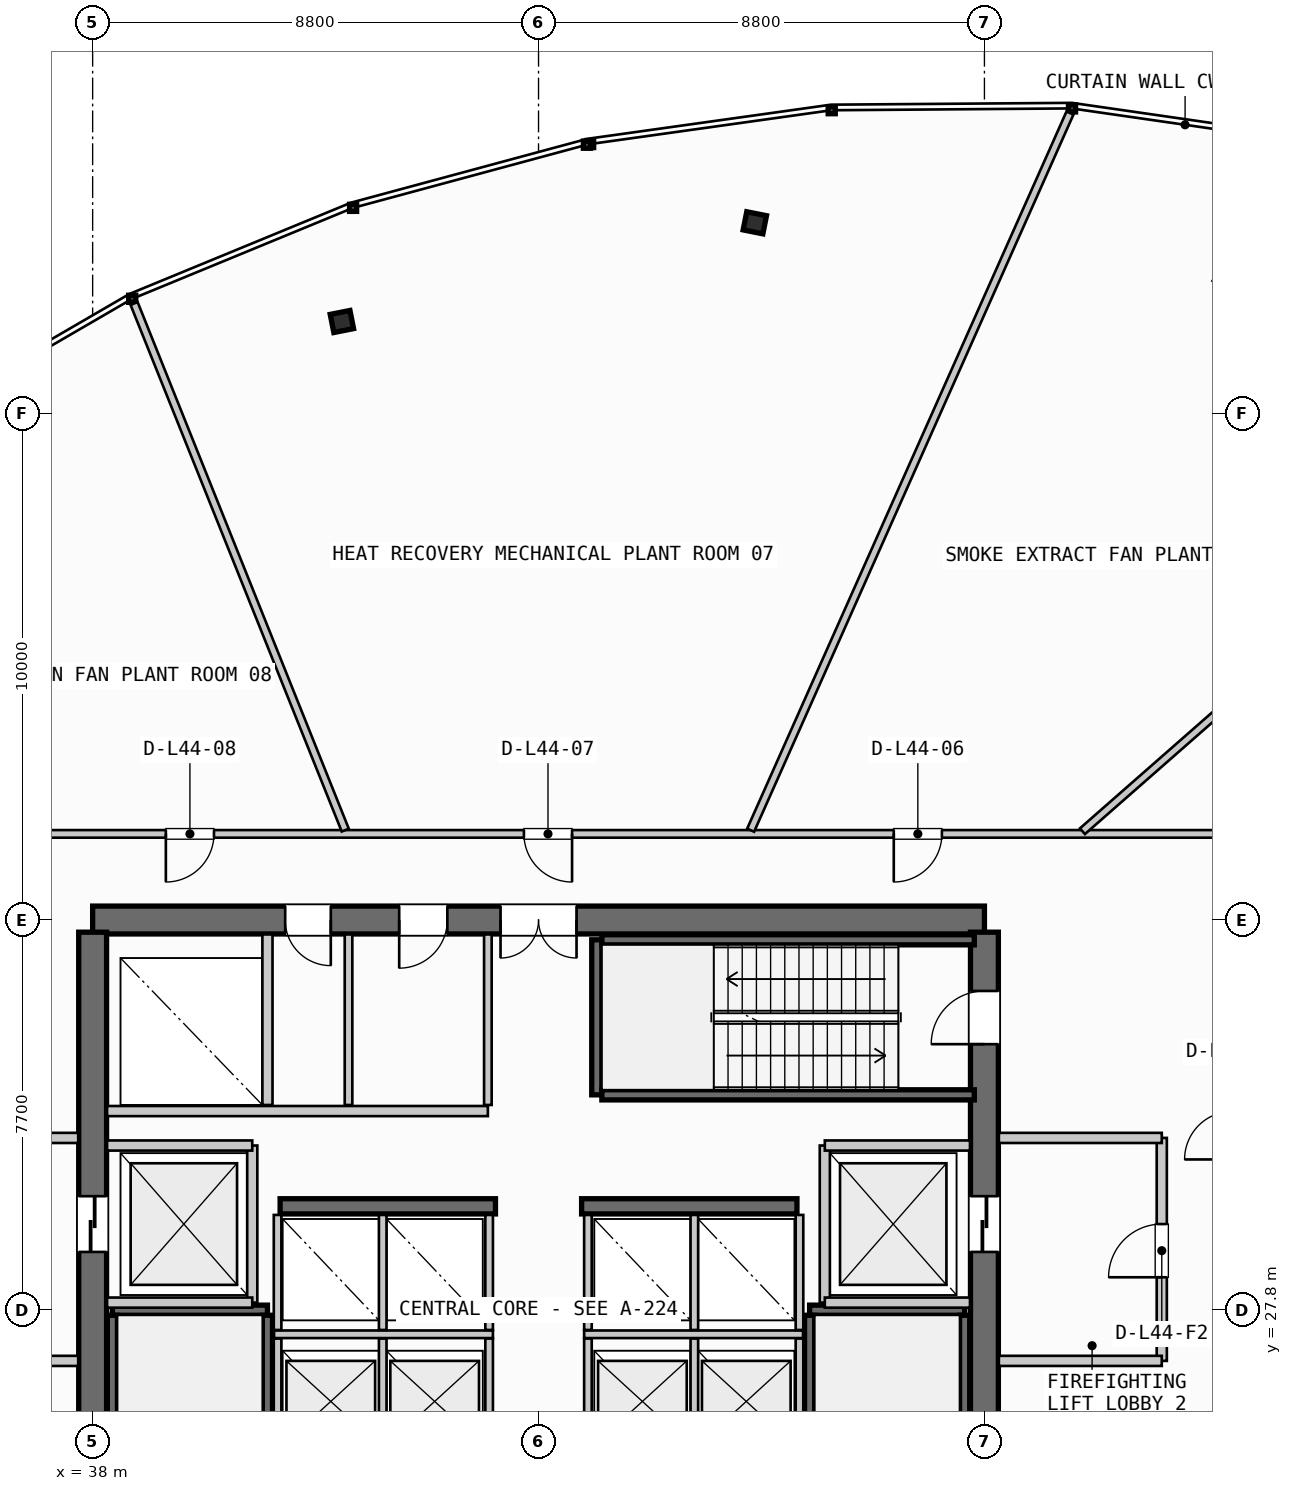
"""IFC4 building model, lengths in metres.
Left out: names, types, materials, properties, quantities, classifications, styles, units other than length and angle.
Written with IfcOpenShell. Run it as: python <this file> out.ifc"""

import sys

from ifc_helpers import new_model, si_unit, direction, frame, frame_2d, origin, origin_2d, place, context, subcontext, project, spatial, rectangle, i_section, extrude, source, transform, mapped, element, fill, save


model = new_model("IFC4")
c1 = context("Model", 3, precision=1e-05, world=origin(), true_north=direction((0.0, 1.0)))
c2 = subcontext(c1, "Body", "Model", "MODEL_VIEW")
j1 = project(units=[si_unit("LENGTHUNIT", "METRE"), si_unit("PLANEANGLEUNIT", "RADIAN")], contexts=[c1])
p1 = place(None, origin())
s1 = spatial("IfcSite", under=j1, at=p1, CompositionType="ELEMENT")
p2 = place(p1, origin())
s2 = spatial("IfcBuilding", under=s1, at=p2, CompositionType="ELEMENT")
p3 = place(p2, frame((0.0, 0.0, 171.4)))
s3 = spatial("IfcBuildingStorey", under=s2, at=p3, CompositionType="ELEMENT", Elevation=171.4)
p4 = place(p3, frame((55.6, 35.5, 0.0), z_axis=(0.0, 0.0, 1.0), x_axis=(-1.0, 0.0, 0.0)))
e1 = element("IfcWall", 1, at=p4, inside=s3, PredefinedType="SHEAR", context=c2, shape_type="SweptSolid", body=[
    extrude(rectangle(XDim=17.6, YDim=0.55, at=frame_2d((8.8, 0.0))), origin(), (0.0, 0.0, 1.0), 4.58),
])
p5 = place(p4, frame((8.05, 0.0, 0.0)))
e2 = element("IfcOpeningElement", 2, at=p5, cuts=e1, PredefinedType="OPENING", context=c2, shape_type="SweptSolid", body=[
    extrude(rectangle(XDim=1.5, YDim=2.2, at=frame_2d((0.75, 1.1))), frame((0.0, 0.285, 0.0), z_axis=(0.0, -1.0, 0.0), x_axis=(1.0, 0.0, 0.0)), (0.0, 0.0, 1.0), 0.57),
])
p6 = place(p4, frame((12.9, 0.0, 0.0)))
e3 = element("IfcOpeningElement", 3, at=p6, cuts=e1, PredefinedType="OPENING", context=c2, shape_type="SweptSolid", body=[
    extrude(rectangle(XDim=0.9, YDim=2.15, at=frame_2d((0.45, 1.075))), frame((0.0, 0.285, 0.0), z_axis=(0.0, -1.0, 0.0), x_axis=(1.0, 0.0, 0.0)), (0.0, 0.0, 1.0), 0.57),
])
p7 = place(p4, frame((10.6, 0.0, 0.0)))
e4 = element("IfcOpeningElement", 4, at=p7, cuts=e1, PredefinedType="OPENING", context=c2, shape_type="SweptSolid", body=[
    extrude(rectangle(XDim=0.95, YDim=2.15, at=frame_2d((0.475, 1.075))), frame((0.0, 0.285, 0.0), z_axis=(0.0, -1.0, 0.0), x_axis=(1.0, 0.0, 0.0)), (0.0, 0.0, 1.0), 0.57),
])
p8 = place(p3, frame((38.0, 35.26, 0.0), z_axis=(0.0, 0.0, 1.0), x_axis=(0.0, -1.0, 0.0)))
e5 = element("IfcWall", 5, at=p8, inside=s3, PredefinedType="SHEAR", context=c2, shape_type="SweptSolid", body=[
    extrude(rectangle(XDim=14.92, YDim=0.55, at=frame_2d((7.46, 0.0))), origin(), (0.0, 0.0, 1.0), 4.58),
])
p9 = place(p8, frame((5.21, 0.0, 0.0)))
e6 = element("IfcOpeningElement", 6, at=p9, cuts=e5, PredefinedType="OPENING", context=c2, shape_type="SweptSolid", body=[
    extrude(rectangle(XDim=1.1, YDim=2.2, at=frame_2d((0.55, 1.1))), frame((0.0, 0.285, 0.0), z_axis=(0.0, -1.0, 0.0), x_axis=(1.0, 0.0, 0.0)), (0.0, 0.0, 1.0), 0.57),
])
p10 = place(p3, frame((55.6, 20.34, 0.0), z_axis=(0.0, 0.0, 1.0), x_axis=(0.0, 1.0, 0.0)))
e7 = element("IfcWall", 7, at=p10, inside=s3, PredefinedType="SHEAR", context=c2, shape_type="SweptSolid", body=[
    extrude(rectangle(XDim=14.92, YDim=0.55, at=frame_2d((7.46, 0.0))), origin(), (0.0, 0.0, 1.0), 4.58),
])
p11 = place(p10, frame((12.71, 0.0, 0.0)))
e8 = element("IfcOpeningElement", 8, at=p11, cuts=e7, PredefinedType="OPENING", context=c2, shape_type="SweptSolid", body=[
    extrude(rectangle(XDim=1.05, YDim=2.15, at=frame_2d((0.525, 1.075))), frame((0.0, 0.285, 0.0), z_axis=(0.0, -1.0, 0.0), x_axis=(1.0, 0.0, 0.0)), (0.0, 0.0, 1.0), 0.57),
])
p12 = place(p10, frame((8.61, 0.0, 0.0)))
e9 = element("IfcOpeningElement", 9, at=p12, cuts=e7, PredefinedType="OPENING", context=c2, shape_type="SweptSolid", body=[
    extrude(rectangle(XDim=1.1, YDim=2.2, at=frame_2d((0.55, 1.1))), frame((0.0, 0.285, 0.0), z_axis=(0.0, -1.0, 0.0), x_axis=(1.0, 0.0, 0.0)), (0.0, 0.0, 1.0), 0.57),
])
for number, where, z_axis, x_axis in (
    (10, (41.7, 29.85, 0.0), (0.0, 0.0, 1.0), (1.0, 0.0, 0.0)),
    (11, (47.65, 29.85, 0.0), (0.0, 0.0, 1.0), (1.0, 0.0, 0.0)),
):
    element("IfcWall", number, at=place(p3, frame(where, z_axis=z_axis, x_axis=x_axis)), inside=s3, PredefinedType="SHEAR", context=c2, shape_type="SweptSolid", body=[
        extrude(rectangle(XDim=4.25, YDim=0.3, at=frame_2d((2.125, 0.0))), origin(), (0.0, 0.0, 1.0), 4.58),
    ])
m1 = source(origin(), c2, "Body", "SweptSolid", [
    extrude(i_section(OverallWidth=0.397, OverallDepth=0.365, WebThickness=0.028, FlangeThickness=0.044, FilletRadius=0.015, at=origin_2d()), origin(), (0.0, 0.0, 1.0), 4.58),
])
for number, where, z_axis, x_axis in (
    (12, (51.069, 49.259, 0.0), (0.0, 0.0, 1.0), (0.195, 0.981, 0.0)),
    (13, (42.919, 47.311, 0.0), (0.0, 0.0, 1.0), (-0.195, 0.981, 0.0)),
):
    element("IfcColumn", number, at=place(p3, frame(where, z_axis=z_axis, x_axis=x_axis)), inside=s3, PredefinedType="COLUMN", context=c2, shape_type="MappedRepresentation", body=[
        mapped(m1, transform((0.0, 0.0, 0.0), scale=1.0)),
    ])
p13 = place(p3, frame((38.39, 27.8, 0.0), z_axis=(0.0, 0.0, 1.0), x_axis=(1.0, 0.0, 0.0)))
e14 = element("IfcWall", 14, at=p13, inside=s3, PredefinedType="SHEAR", context=c2, shape_type="SweptSolid", body=[
    extrude(rectangle(XDim=3.06, YDim=0.2, at=frame_2d((1.53, 0.0))), origin(), (0.0, 0.0, 1.0), 4.58),
])
for number, where, z_axis, x_axis in (
    (15, (41.45, 27.7, 0.0), (0.0, 0.0, 1.0), (0.0, -1.0, 0.0)),
    (16, (38.39, 20.35, 0.0), (0.0, 0.0, 1.0), (0.0, 1.0, 0.0)),
):
    element("IfcWall", number, at=place(p3, frame(where, z_axis=z_axis, x_axis=x_axis)), inside=s3, PredefinedType="SHEAR", context=c2, shape_type="SweptSolid", body=[
        extrude(rectangle(XDim=7.35, YDim=0.2, at=frame_2d((3.675, 0.0))), origin(), (0.0, 0.0, 1.0), 4.58),
    ])
p14 = place(p3, frame((52.15, 27.8, 0.0), z_axis=(0.0, 0.0, 1.0), x_axis=(1.0, 0.0, 0.0)))
e17 = element("IfcWall", 17, at=p14, inside=s3, PredefinedType="SHEAR", context=c2, shape_type="SweptSolid", body=[
    extrude(rectangle(XDim=3.06, YDim=0.2, at=frame_2d((1.53, 0.0))), origin(), (0.0, 0.0, 1.0), 4.58),
])
for number, where, z_axis, x_axis in (
    (18, (55.21, 27.7, 0.0), (0.0, 0.0, 1.0), (0.0, -1.0, 0.0)),
    (19, (52.15, 20.35, 0.0), (0.0, 0.0, 1.0), (0.0, 1.0, 0.0)),
):
    element("IfcWall", number, at=place(p3, frame(where, z_axis=z_axis, x_axis=x_axis)), inside=s3, PredefinedType="SHEAR", context=c2, shape_type="SweptSolid", body=[
        extrude(rectangle(XDim=7.35, YDim=0.2, at=frame_2d((3.675, 0.0))), origin(), (0.0, 0.0, 1.0), 4.58),
    ])
p15 = place(p3, frame((47.95, 32.05, 0.0), z_axis=(0.0, 0.0, 1.0), x_axis=(0.0, 1.0, 0.0)))
e20 = element("IfcWall", 20, at=p15, inside=s3, PredefinedType="SHEAR", context=c2, shape_type="SweptSolid", body=[
    extrude(rectangle(XDim=3.06, YDim=0.2, at=frame_2d((1.53, 0.0))), origin(), (0.0, 0.0, 1.0), 4.58),
])
for number, where, z_axis, x_axis in (
    (21, (48.05, 35.11, 0.0), (0.0, 0.0, 1.0), (1.0, 0.0, 0.0)),
    (22, (55.4, 32.05, 0.0), (0.0, 0.0, 1.0), (-1.0, 0.0, 0.0)),
):
    element("IfcWall", number, at=place(p3, frame(where, z_axis=z_axis, x_axis=x_axis)), inside=s3, PredefinedType="SHEAR", context=c2, shape_type="SweptSolid", body=[
        extrude(rectangle(XDim=7.35, YDim=0.2, at=frame_2d((3.675, 0.0))), origin(), (0.0, 0.0, 1.0), 4.58),
    ])
p16 = place(p3, frame((41.15, 27.95, 0.0), z_axis=(0.0, 0.0, 1.0), x_axis=(0.0, 1.0, 0.0)))
e23 = element("IfcWall", 23, at=p16, inside=s3, PredefinedType="PARTITIONING", context=c2, shape_type="SweptSolid", body=[
    extrude(rectangle(XDim=3.1, YDim=0.2, at=frame_2d((1.55, 0.0))), origin(), (0.0, 0.0, 1.0), 2.355),
])
for number, where, z_axis, x_axis in (
    (24, (38.285, 27.95, 0.0), (0.0, 0.0, 1.0), (1.0, 0.0, 0.0)),
    (25, (38.285, 31.05, 0.0), (0.0, 0.0, 1.0), (1.0, 0.0, 0.0)),
):
    element("IfcWall", number, at=place(p3, frame(where, z_axis=z_axis, x_axis=x_axis)), inside=s3, PredefinedType="PARTITIONING", context=c2, shape_type="SweptSolid", body=[
        extrude(rectangle(XDim=2.865, YDim=0.2, at=frame_2d((1.433, 0.0))), origin(), (0.0, 0.0, 1.0), 2.355),
    ])
for number, where, z_axis, x_axis in (
    (26, (34.5, 26.8, 0.0), (0.0, 0.0, 1.0), (1.0, 0.0, 0.0)),
    (27, (34.5, 31.2, 0.0), (0.0, 0.0, 1.0), (1.0, 0.0, 0.0)),
):
    element("IfcWall", number, at=place(p3, frame(where, z_axis=z_axis, x_axis=x_axis)), inside=s3, PredefinedType="PARTITIONING", context=c2, shape_type="SweptSolid", body=[
        extrude(rectangle(XDim=3.215, YDim=0.2, at=frame_2d((1.607, 0.0))), origin(), (0.0, 0.0, 1.0), 2.355),
    ])
p17 = place(p3, frame((52.45, 27.95, 0.0), z_axis=(0.0, 0.0, 1.0), x_axis=(0.0, 1.0, 0.0)))
e28 = element("IfcWall", 28, at=p17, inside=s3, PredefinedType="PARTITIONING", context=c2, shape_type="SweptSolid", body=[
    extrude(rectangle(XDim=3.1, YDim=0.2, at=frame_2d((1.55, 0.0))), origin(), (0.0, 0.0, 1.0), 2.355),
])
for number, where, z_axis, x_axis in (
    (29, (52.45, 27.95, 0.0), (0.0, 0.0, 1.0), (1.0, 0.0, 0.0)),
    (30, (52.45, 31.05, 0.0), (0.0, 0.0, 1.0), (1.0, 0.0, 0.0)),
):
    element("IfcWall", number, at=place(p3, frame(where, z_axis=z_axis, x_axis=x_axis)), inside=s3, PredefinedType="PARTITIONING", context=c2, shape_type="SweptSolid", body=[
        extrude(rectangle(XDim=2.865, YDim=0.2, at=frame_2d((1.433, 0.0))), origin(), (0.0, 0.0, 1.0), 2.355),
    ])
p18 = place(p3, frame((59.1, 26.8, 0.0), z_axis=(0.0, 0.0, 1.0), x_axis=(0.0, 1.0, 0.0)))
e31 = element("IfcWall", 31, at=p18, inside=s3, PredefinedType="PARTITIONING", context=c2, shape_type="SweptSolid", body=[
    extrude(rectangle(XDim=4.4, YDim=0.2, at=frame_2d((2.2, 0.0))), origin(), (0.0, 0.0, 1.0), 2.355),
])
p19 = place(p18, frame((1.65, 0.0, 0.0)))
e32 = element("IfcOpeningElement", 32, at=p19, cuts=e31, PredefinedType="OPENING", context=c2, shape_type="SweptSolid", body=[
    extrude(rectangle(XDim=1.05, YDim=2.15, at=frame_2d((0.525, 1.075))), frame((0.0, 0.11, 0.0), z_axis=(0.0, -1.0, 0.0), x_axis=(1.0, 0.0, 0.0)), (0.0, 0.0, 1.0), 0.22),
])
for number, where, z_axis, x_axis in (
    (33, (55.885, 26.8, 0.0), (0.0, 0.0, 1.0), (1.0, 0.0, 0.0)),
    (34, (55.885, 31.2, 0.0), (0.0, 0.0, 1.0), (1.0, 0.0, 0.0)),
):
    element("IfcWall", number, at=place(p3, frame(where, z_axis=z_axis, x_axis=x_axis)), inside=s3, PredefinedType="PARTITIONING", context=c2, shape_type="SweptSolid", body=[
        extrude(rectangle(XDim=3.215, YDim=0.2, at=frame_2d((1.607, 0.0))), origin(), (0.0, 0.0, 1.0), 2.355),
    ])
p20 = place(p3, frame((41.58, 27.325, 0.0), z_axis=(0.0, 0.0, 1.0), x_axis=(1.0, 0.0, 0.0)))
e35 = element("IfcWall", 35, at=p20, inside=s3, PredefinedType="PARTITIONING", context=c2, shape_type="SweptSolid", body=[
    extrude(rectangle(XDim=4.32, YDim=0.15, at=frame_2d((2.16, 0.0))), origin(), (0.0, 0.0, 1.0), 2.355),
])
p21 = place(p3, frame((47.7, 27.325, 0.0), z_axis=(0.0, 0.0, 1.0), x_axis=(1.0, 0.0, 0.0)))
e36 = element("IfcWall", 36, at=p21, inside=s3, PredefinedType="PARTITIONING", context=c2, shape_type="SweptSolid", body=[
    extrude(rectangle(XDim=4.32, YDim=0.15, at=frame_2d((2.16, 0.0))), origin(), (0.0, 0.0, 1.0), 2.355),
])
for number, where, z_axis, x_axis in (
    (37, (41.65, 24.92, 0.0), (0.0, 0.0, 1.0), (0.0, 1.0, 0.0)),
    (38, (43.725, 24.92, 0.0), (0.0, 0.0, 1.0), (0.0, 1.0, 0.0)),
    (39, (45.825, 24.92, 0.0), (0.0, 0.0, 1.0), (0.0, 1.0, 0.0)),
    (40, (47.775, 24.92, 0.0), (0.0, 0.0, 1.0), (0.0, 1.0, 0.0)),
    (41, (49.875, 24.92, 0.0), (0.0, 0.0, 1.0), (0.0, 1.0, 0.0)),
    (42, (51.95, 24.92, 0.0), (0.0, 0.0, 1.0), (0.0, 1.0, 0.0)),
):
    element("IfcWall", number, at=place(p3, frame(where, z_axis=z_axis, x_axis=x_axis)), inside=s3, PredefinedType="PARTITIONING", context=c2, shape_type="SweptSolid", body=[
        extrude(rectangle(XDim=2.32, YDim=0.15, at=frame_2d((1.16, 0.0))), origin(), (0.0, 0.0, 1.0), 2.355),
    ])
for number, where, z_axis, x_axis in (
    (43, (41.65, 27.41, 0.0), (0.0, 0.0, 1.0), (0.0, 1.0, 0.0)),
    (44, (43.725, 27.41, 0.0), (0.0, 0.0, 1.0), (0.0, 1.0, 0.0)),
    (45, (45.825, 27.41, 0.0), (0.0, 0.0, 1.0), (0.0, 1.0, 0.0)),
    (46, (47.775, 27.41, 0.0), (0.0, 0.0, 1.0), (0.0, 1.0, 0.0)),
    (47, (49.875, 27.41, 0.0), (0.0, 0.0, 1.0), (0.0, 1.0, 0.0)),
    (48, (51.95, 27.41, 0.0), (0.0, 0.0, 1.0), (0.0, 1.0, 0.0)),
):
    element("IfcWall", number, at=place(p3, frame(where, z_axis=z_axis, x_axis=x_axis)), inside=s3, PredefinedType="PARTITIONING", context=c2, shape_type="SweptSolid", body=[
        extrude(rectangle(XDim=2.27, YDim=0.15, at=frame_2d((1.135, 0.0))), origin(), (0.0, 0.0, 1.0), 2.355),
    ])
p22 = place(p3, frame((41.45, 31.85, 0.0), z_axis=(0.0, 0.0, 1.0), x_axis=(0.0, 1.0, 0.0)))
e49 = element("IfcWall", 49, at=p22, inside=s3, PredefinedType="PARTITIONING", context=c2, shape_type="SweptSolid", body=[
    extrude(rectangle(XDim=3.365, YDim=0.2, at=frame_2d((1.683, 0.0))), origin(), (0.0, 0.0, 1.0), 2.355),
])
p23 = place(p3, frame((38.285, 31.73, 0.0), z_axis=(0.0, 0.0, 1.0), x_axis=(1.0, 0.0, 0.0)))
e50 = element("IfcWall", 50, at=p23, inside=s3, PredefinedType="PARTITIONING", context=c2, shape_type="SweptSolid", body=[
    extrude(rectangle(XDim=7.515, YDim=0.2, at=frame_2d((3.758, 0.0))), origin(), (0.0, 0.0, 1.0), 2.355),
])
p24 = place(p3, frame((45.8, 31.85, 0.0), z_axis=(0.0, 0.0, 1.0), x_axis=(0.0, 1.0, 0.0)))
e51 = element("IfcWall", 51, at=p24, inside=s3, PredefinedType="PARTITIONING", context=c2, shape_type="SweptSolid", body=[
    extrude(rectangle(XDim=3.365, YDim=0.15, at=frame_2d((1.683, 0.0))), origin(), (0.0, 0.0, 1.0), 2.355),
])
p25 = place(p3, frame((43.05, 31.85, 0.0), z_axis=(0.0, 0.0, 1.0), x_axis=(0.0, 1.0, 0.0)))
e52 = element("IfcWall", 52, at=p25, inside=s3, PredefinedType="PLUMBINGWALL", context=c2, shape_type="SweptSolid", body=[
    extrude(rectangle(XDim=3.365, YDim=0.15, at=frame_2d((1.683, 0.0))), origin(), (0.0, 0.0, 1.0), 2.355),
])
p26 = place(p3, frame((60.5, 37.2, 0.0), z_axis=(0.0, 0.0, 1.0), x_axis=(-1.0, 0.0, 0.0)))
e53 = element("IfcWall", 53, at=p26, inside=s3, PredefinedType="PARTITIONING", context=c2, shape_type="SweptSolid", body=[
    extrude(rectangle(XDim=27.4, YDim=0.15, at=frame_2d((13.7, 0.0))), origin(), (0.0, 0.0, 1.0), 2.355),
])
p27 = place(p26, frame((5.739, 0.0, 0.0)))
e54 = element("IfcOpeningElement", 54, at=p27, cuts=e53, PredefinedType="OPENING", context=c2, shape_type="SweptSolid", body=[
    extrude(rectangle(XDim=0.95, YDim=2.15, at=frame_2d((0.475, 1.075))), frame((0.0, 0.085, 0.0), z_axis=(0.0, -1.0, 0.0), x_axis=(1.0, 0.0, 0.0)), (0.0, 0.0, 1.0), 0.17),
])
p28 = place(p26, frame((13.038, 0.0, 0.0)))
e55 = element("IfcOpeningElement", 55, at=p28, cuts=e53, PredefinedType="OPENING", context=c2, shape_type="SweptSolid", body=[
    extrude(rectangle(XDim=0.95, YDim=2.15, at=frame_2d((0.475, 1.075))), frame((0.0, 0.085, 0.0), z_axis=(0.0, -1.0, 0.0), x_axis=(1.0, 0.0, 0.0)), (0.0, 0.0, 1.0), 0.17),
])
p29 = place(p26, frame((20.105, 0.0, 0.0)))
e56 = element("IfcOpeningElement", 56, at=p29, cuts=e53, PredefinedType="OPENING", context=c2, shape_type="SweptSolid", body=[
    extrude(rectangle(XDim=0.95, YDim=2.15, at=frame_2d((0.475, 1.075))), frame((0.0, 0.085, 0.0), z_axis=(0.0, -1.0, 0.0), x_axis=(1.0, 0.0, 0.0)), (0.0, 0.0, 1.0), 0.17),
])
p30 = place(p3, frame((57.534, 37.253, 0.0), z_axis=(0.0, 0.0, 1.0), x_axis=(0.751830096588, 0.659356888085, 0.0)))
e57 = element("IfcWall", 57, at=p30, inside=s3, PredefinedType="PARTITIONING", context=c2, shape_type="SweptSolid", body=[
    extrude(rectangle(XDim=15.344, YDim=0.15, at=frame_2d((7.672, 0.0))), origin(), (0.0, 0.0, 1.0), 2.355),
])
p31 = place(p3, frame((50.986, 37.273, 0.0), z_axis=(0.0, 0.0, 1.0), x_axis=(0.406800747022, 0.913516914032, 0.0)))
e58 = element("IfcWall", 58, at=p31, inside=s3, PredefinedType="PARTITIONING", context=c2, shape_type="SweptSolid", body=[
    extrude(rectangle(XDim=15.492, YDim=0.15, at=frame_2d((7.746, 0.0))), origin(), (0.0, 0.0, 1.0), 2.355),
])
p32 = place(p3, frame((42.986, 37.274, 0.0), z_axis=(0.0, 0.0, 1.0), x_axis=(-0.372195030978, 0.928154544737, 0.0)))
e59 = element("IfcWall", 59, at=p32, inside=s3, PredefinedType="PARTITIONING", context=c2, shape_type="SweptSolid", body=[
    extrude(rectangle(XDim=11.197, YDim=0.15, at=frame_2d((5.599, 0.0))), origin(), (0.0, 0.0, 1.0), 2.355),
])
m2 = source(origin(), c2, "Body", "SweptSolid", [
    extrude(rectangle(XDim=1.05, YDim=2.15, at=frame_2d((0.525, 1.075))), frame((0.0, 0.025, 0.0), z_axis=(0.0, -1.0, 0.0), x_axis=(1.0, 0.0, 0.0)), (0.0, 0.0, 1.0), 0.05),
])
p33 = place(p11, origin())
e60 = element("IfcDoor", 60, at=p33, inside=s3, OperationType="SINGLE_SWING_LEFT", PredefinedType="DOOR", context=c2, shape_type="MappedRepresentation", body=[
    mapped(m2, transform((0.0, 0.0, 0.0), scale=1.0)),
])
fill(e8, e60)
m3 = source(origin(), c2, "Body", "SweptSolid", [
    extrude(rectangle(XDim=1.5, YDim=2.2, at=frame_2d((0.75, 1.1))), frame((0.0, 0.025, 0.0), z_axis=(0.0, -1.0, 0.0), x_axis=(1.0, 0.0, 0.0)), (0.0, 0.0, 1.0), 0.05),
])
p34 = place(p5, origin())
e61 = element("IfcDoor", 61, at=p34, inside=s3, OperationType="DOUBLE_DOOR_SINGLE_SWING", PredefinedType="DOOR", context=c2, shape_type="MappedRepresentation", body=[
    mapped(m3, transform((0.0, 0.0, 0.0), scale=1.0)),
])
fill(e2, e61)
m4 = source(origin(), c2, "Body", "SweptSolid", [
    extrude(rectangle(XDim=1.1, YDim=2.2, at=frame_2d((0.55, 1.1))), frame((0.0, 0.025, 0.0), z_axis=(0.0, -1.0, 0.0), x_axis=(1.0, 0.0, 0.0)), (0.0, 0.0, 1.0), 0.05),
])
p35 = place(p9, origin())
e62 = element("IfcDoor", 62, at=p35, inside=s3, OperationType="SLIDING_TO_LEFT", PredefinedType="DOOR", context=c2, shape_type="MappedRepresentation", body=[
    mapped(m4, transform((0.0, 0.0, 0.0), scale=1.0)),
])
fill(e6, e62)
p36 = place(p12, origin())
e63 = element("IfcDoor", 63, at=p36, inside=s3, OperationType="SLIDING_TO_RIGHT", PredefinedType="DOOR", context=c2, shape_type="MappedRepresentation", body=[
    mapped(m4, transform((0.0, 0.0, 0.0), scale=1.0)),
])
fill(e9, e63)
m5 = source(origin(), c2, "Body", "SweptSolid", [
    extrude(rectangle(XDim=0.9, YDim=2.15, at=frame_2d((0.45, 1.075))), frame((0.0, 0.025, 0.0), z_axis=(0.0, -1.0, 0.0), x_axis=(1.0, 0.0, 0.0)), (0.0, 0.0, 1.0), 0.05),
])
p37 = place(p6, origin())
e64 = element("IfcDoor", 64, at=p37, inside=s3, OperationType="SINGLE_SWING_LEFT", PredefinedType="DOOR", context=c2, shape_type="MappedRepresentation", body=[
    mapped(m5, transform((0.0, 0.0, 0.0), scale=1.0)),
])
fill(e3, e64)
m6 = source(origin(), c2, "Body", "SweptSolid", [
    extrude(rectangle(XDim=0.95, YDim=2.15, at=frame_2d((0.475, 1.075))), frame((0.0, 0.025, 0.0), z_axis=(0.0, -1.0, 0.0), x_axis=(1.0, 0.0, 0.0)), (0.0, 0.0, 1.0), 0.05),
])
p38 = place(p7, origin())
e65 = element("IfcDoor", 65, at=p38, inside=s3, OperationType="SINGLE_SWING_RIGHT", PredefinedType="DOOR", context=c2, shape_type="MappedRepresentation", body=[
    mapped(m6, transform((0.0, 0.0, 0.0), scale=1.0)),
])
fill(e4, e65)
p39 = place(p19, origin())
e66 = element("IfcDoor", 66, at=p39, inside=s3, OperationType="SINGLE_SWING_LEFT", PredefinedType="DOOR", context=c2, shape_type="MappedRepresentation", body=[
    mapped(m2, transform((0.0, 0.0, 0.0), scale=1.0)),
])
fill(e32, e66)
p40 = place(p27, origin())
e67 = element("IfcDoor", 67, at=p40, inside=s3, OperationType="SINGLE_SWING_RIGHT", PredefinedType="DOOR", context=c2, shape_type="MappedRepresentation", body=[
    mapped(m6, transform((0.0, 0.0, 0.0), scale=1.0)),
])
fill(e54, e67)
p41 = place(p28, origin())
e68 = element("IfcDoor", 68, at=p41, inside=s3, OperationType="SINGLE_SWING_LEFT", PredefinedType="DOOR", context=c2, shape_type="MappedRepresentation", body=[
    mapped(m6, transform((0.0, 0.0, 0.0), scale=1.0)),
])
fill(e55, e68)
p42 = place(p29, origin())
e69 = element("IfcDoor", 69, at=p42, inside=s3, OperationType="SINGLE_SWING_RIGHT", PredefinedType="DOOR", context=c2, shape_type="MappedRepresentation", body=[
    mapped(m6, transform((0.0, 0.0, 0.0), scale=1.0)),
])
fill(e56, e69)
save(model, sys.argv[1])
